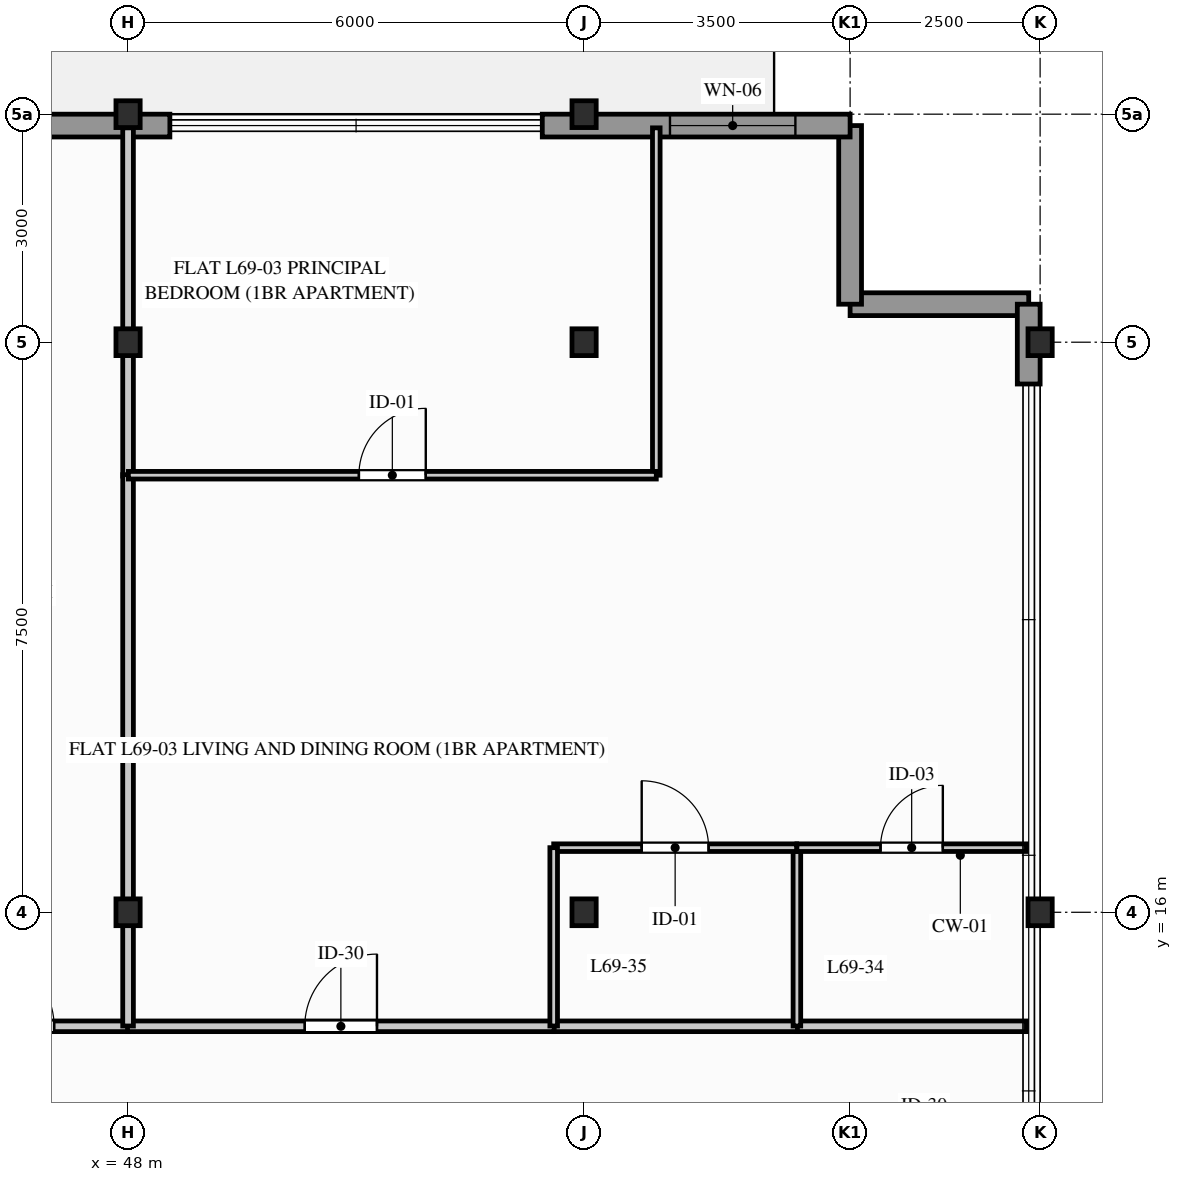
"""IFC4 building model, lengths in metres.
Left out: names, types, materials, properties, quantities, classifications, styles, units other than length and angle.
Written with IfcOpenShell. Run it as: python <this file> out.ifc"""

import sys

from ifc_helpers import new_model, si_unit, direction, frame, frame_2d, origin, origin_2d, place, context, subcontext, project, spatial, rectangle, i_section, extrude, element, fill, save


model = new_model("IFC4")
c1 = context("Model", 3, precision=1e-05, world=origin(), true_north=direction((0.0, 1.0)))
c2 = subcontext(c1, "Body", "Model", "MODEL_VIEW")
j1 = project(units=[si_unit("LENGTHUNIT", "METRE"), si_unit("PLANEANGLEUNIT", "RADIAN")], contexts=[c1])
p1 = place(None, origin())
s1 = spatial("IfcSite", under=j1, at=p1, CompositionType="ELEMENT")
p2 = place(p1, origin())
s2 = spatial("IfcBuilding", under=s1, at=p2, CompositionType="ELEMENT")
p3 = place(p2, frame((0.0, 0.0, 227.3)))
s3 = spatial("IfcBuildingStorey", under=s2, at=p3, CompositionType="ELEMENT", Elevation=227.3)
for number, where, z_axis, x_axis in (
    (1, (48.0, 16.0, 0.0), (0.0, 0.0, 1.0), (1.0, 0.0, 0.0)),
    (2, (48.0, 23.5, 0.0), (0.0, 0.0, 1.0), (1.0, 0.0, 0.0)),
    (3, (48.0, 26.5, 0.0), (0.0, 0.0, 1.0), (1.0, 0.0, 0.0)),
    (4, (54.0, 16.0, 0.0), (0.0, 0.0, 1.0), (1.0, 0.0, 0.0)),
    (5, (54.0, 23.5, 0.0), (0.0, 0.0, 1.0), (1.0, 0.0, 0.0)),
    (6, (54.0, 26.5, 0.0), (0.0, 0.0, 1.0), (1.0, 0.0, 0.0)),
    (7, (60.0, 16.0, 0.0), (0.0, 0.0, 1.0), (1.0, 0.0, 0.0)),
    (8, (60.0, 23.5, 0.0), (0.0, 0.0, 1.0), (1.0, 0.0, 0.0)),
):
    element("IfcColumn", number, at=place(p3, frame(where, z_axis=z_axis, x_axis=x_axis)), inside=s3, PredefinedType="COLUMN", context=c2, shape_type="SweptSolid", body=[
        extrude(i_section(OverallWidth=0.318, OverallDepth=0.353, WebThickness=0.023, FlangeThickness=0.038, FilletRadius=0.015, at=origin_2d()), origin(), (0.0, 0.0, 1.0), 3.1),
    ])
for number, where, z_axis, x_axis in (
    (9, (59.85, 24.0, 0.0), (0.0, 0.0, 1.0), (-1.0, 0.0, 0.0)),
    (10, (57.5, 24.0, 0.0), (0.0, 0.0, 1.0), (0.0, 1.0, 0.0)),
):
    element("IfcWall", number, at=place(p3, frame(where, z_axis=z_axis, x_axis=x_axis)), inside=s3, PredefinedType="STANDARD", context=c2, shape_type="SweptSolid", body=[
        extrude(rectangle(XDim=2.35, YDim=0.3, at=frame_2d((1.175, 0.0))), origin(), (0.0, 0.0, 1.0), 2.89),
    ])
p4 = place(p3, frame((59.85, 22.95, 0.0), z_axis=(0.0, 0.0, 1.0), x_axis=(0.0, 1.0, 0.0)))
e11 = element("IfcWall", 11, at=p4, inside=s3, PredefinedType="STANDARD", context=c2, shape_type="SweptSolid", body=[
    extrude(rectangle(XDim=1.05, YDim=0.3, at=frame_2d((0.525, 0.0))), origin(), (0.0, 0.0, 1.0), 2.89),
])
p5 = place(p3, frame((37.7, 26.35, 0.0), z_axis=(0.0, 0.0, 1.0), x_axis=(1.0, 0.0, 0.0)))
e12 = element("IfcWall", 12, at=p5, inside=s3, PredefinedType="STANDARD", context=c2, shape_type="SweptSolid", body=[
    extrude(rectangle(XDim=10.85, YDim=0.3, at=frame_2d((5.425, 0.0))), origin(), (0.0, 0.0, 1.0), 2.332),
])
p6 = place(p5, frame((5.475, 0.0, 0.0)))
e13 = element("IfcOpeningElement", 13, at=p6, cuts=e12, PredefinedType="OPENING", context=c2, shape_type="SweptSolid", body=[
    extrude(rectangle(XDim=1.25, YDim=2.2, at=frame_2d((0.625, 1.1))), frame((0.0, 0.16, 0.0), z_axis=(0.0, -1.0, 0.0), x_axis=(1.0, 0.0, 0.0)), (0.0, 0.0, 1.0), 0.32),
])
p7 = place(p5, frame((2.081, 0.0, 0.512)))
e14 = element("IfcOpeningElement", 14, at=p7, cuts=e12, PredefinedType="OPENING", context=c2, shape_type="SweptSolid", body=[
    extrude(rectangle(XDim=1.2, YDim=1.6, at=frame_2d((0.6, 0.8))), frame((0.0, 0.16, 0.0), z_axis=(0.0, -1.0, 0.0), x_axis=(1.0, 0.0, 0.0)), (0.0, 0.0, 1.0), 0.32),
])
p8 = place(p3, frame((53.45, 26.35, 0.0), z_axis=(0.0, 0.0, 1.0), x_axis=(1.0, 0.0, 0.0)))
e15 = element("IfcWall", 15, at=p8, inside=s3, PredefinedType="STANDARD", context=c2, shape_type="SweptSolid", body=[
    extrude(rectangle(XDim=4.05, YDim=0.3, at=frame_2d((2.025, 0.0))), origin(), (0.0, 0.0, 1.0), 2.89),
])
p9 = place(p8, frame((1.68, 0.0, 0.77)))
e16 = element("IfcOpeningElement", 16, at=p9, cuts=e15, PredefinedType="OPENING", context=c2, shape_type="SweptSolid", body=[
    extrude(rectangle(XDim=1.65, YDim=1.9, at=frame_2d((0.825, 0.95))), frame((0.0, 0.16, 0.0), z_axis=(0.0, -1.0, 0.0), x_axis=(1.0, 0.0, 0.0)), (0.0, 0.0, 1.0), 0.32),
])
p10 = place(p3, frame((45.093, 14.5, 0.0), z_axis=(0.0, 0.0, 1.0), x_axis=(1.0, 0.0, 0.0)))
e17 = element("IfcWall", 17, at=p10, inside=s3, PredefinedType="PARTITIONING", context=c2, shape_type="SweptSolid", body=[
    extrude(rectangle(XDim=2.918, YDim=0.14, at=frame_2d((1.459, 0.0))), origin(), (0.0, 0.0, 1.0), 2.325),
])
p11 = place(p10, frame((0.984, 0.0, 0.0)))
e18 = element("IfcOpeningElement", 18, at=p11, cuts=e17, PredefinedType="OPENING", context=c2, shape_type="SweptSolid", body=[
    extrude(rectangle(XDim=0.95, YDim=2.05, at=frame_2d((0.475, 1.025))), frame((0.0, 0.08, 0.0), z_axis=(0.0, -1.0, 0.0), x_axis=(1.0, 0.0, 0.0)), (0.0, 0.0, 1.0), 0.16),
])
p12 = place(p3, frame((56.789, 14.5, 0.0), z_axis=(0.0, 0.0, 1.0), x_axis=(1.0, 0.0, 0.0)))
e19 = element("IfcWall", 19, at=p12, inside=s3, PredefinedType="PARTITIONING", context=c2, shape_type="SweptSolid", body=[
    extrude(rectangle(XDim=3.031, YDim=0.14, at=frame_2d((1.516, 0.0))), origin(), (0.0, 0.0, 1.0), 2.89),
])
p13 = place(p3, frame((53.589, 14.5, 0.0), z_axis=(0.0, 0.0, 1.0), x_axis=(1.0, 0.0, 0.0)))
e20 = element("IfcWall", 20, at=p13, inside=s3, PredefinedType="PARTITIONING", context=c2, shape_type="SweptSolid", body=[
    extrude(rectangle(XDim=3.219, YDim=0.14, at=frame_2d((1.609, 0.0))), origin(), (0.0, 0.0, 1.0), 2.325),
])
p14 = place(p3, frame((47.993, 14.5, 0.0), z_axis=(0.0, 0.0, 1.0), x_axis=(1.0, 0.0, 0.0)))
e21 = element("IfcWall", 21, at=p14, inside=s3, PredefinedType="PARTITIONING", context=c2, shape_type="SweptSolid", body=[
    extrude(rectangle(XDim=5.615, YDim=0.14, at=frame_2d((2.807, 0.0))), origin(), (0.0, 0.0, 1.0), 2.325),
])
p15 = place(p14, frame((2.332, 0.0, 0.0)))
e22 = element("IfcOpeningElement", 22, at=p15, cuts=e21, PredefinedType="OPENING", context=c2, shape_type="SweptSolid", body=[
    extrude(rectangle(XDim=0.95, YDim=2.05, at=frame_2d((0.475, 1.025))), frame((0.0, 0.08, 0.0), z_axis=(0.0, -1.0, 0.0), x_axis=(1.0, 0.0, 0.0)), (0.0, 0.0, 1.0), 0.16),
])
p16 = place(p3, frame((48.0, 21.739, 0.0), z_axis=(0.0, 0.0, 1.0), x_axis=(0.0, 1.0, 0.0)))
e23 = element("IfcWall", 23, at=p16, inside=s3, PredefinedType="PARTITIONING", context=c2, shape_type="SweptSolid", body=[
    extrude(rectangle(XDim=4.581, YDim=0.14, at=frame_2d((2.291, 0.0))), origin(), (0.0, 0.0, 1.0), 2.325),
])
p17 = place(p3, frame((48.0, 14.504, 0.0), z_axis=(0.0, 0.0, 1.0), x_axis=(0.0, 1.0, 0.0)))
e24 = element("IfcWall", 24, at=p17, inside=s3, PredefinedType="PARTITIONING", context=c2, shape_type="SweptSolid", body=[
    extrude(rectangle(XDim=7.253, YDim=0.14, at=frame_2d((3.627, 0.0))), origin(), (0.0, 0.0, 1.0), 2.325),
])
p18 = place(p3, frame((56.8, 14.504, 0.0), z_axis=(0.0, 0.0, 1.0), x_axis=(0.0, 1.0, 0.0)))
e25 = element("IfcWall", 25, at=p18, inside=s3, PredefinedType="PARTITIONING", context=c2, shape_type="SweptSolid", body=[
    extrude(rectangle(XDim=2.346, YDim=0.1, at=frame_2d((1.173, 0.0))), origin(), (0.0, 0.0, 1.0), 2.325),
])
p19 = place(p3, frame((56.8, 16.85, 0.0), z_axis=(0.0, 0.0, 1.0), x_axis=(1.0, 0.0, 0.0)))
e26 = element("IfcWall", 26, at=p19, inside=s3, PredefinedType="PARTITIONING", context=c2, shape_type="SweptSolid", body=[
    extrude(rectangle(XDim=3.02, YDim=0.1, at=frame_2d((1.51, 0.0))), origin(), (0.0, 0.0, 1.0), 2.89),
])
p20 = place(p19, frame((1.1, 0.0, 0.0)))
e27 = element("IfcOpeningElement", 27, at=p20, cuts=e26, PredefinedType="OPENING", context=c2, shape_type="SweptSolid", body=[
    extrude(rectangle(XDim=0.82, YDim=2.02, at=frame_2d((0.41, 1.01))), frame((0.0, 0.06, 0.0), z_axis=(0.0, -1.0, 0.0), x_axis=(1.0, 0.0, 0.0)), (0.0, 0.0, 1.0), 0.12),
])
p21 = place(p3, frame((53.6, 16.85, 0.0), z_axis=(0.0, 0.0, 1.0), x_axis=(1.0, 0.0, 0.0)))
e28 = element("IfcWall", 28, at=p21, inside=s3, PredefinedType="PARTITIONING", context=c2, shape_type="SweptSolid", body=[
    extrude(rectangle(XDim=3.196, YDim=0.1, at=frame_2d((1.598, 0.0))), origin(), (0.0, 0.0, 1.0), 2.325),
])
p22 = place(p21, frame((1.158, 0.0, 0.0)))
e29 = element("IfcOpeningElement", 29, at=p22, cuts=e28, PredefinedType="OPENING", context=c2, shape_type="SweptSolid", body=[
    extrude(rectangle(XDim=0.88, YDim=2.04, at=frame_2d((0.44, 1.02))), frame((0.0, 0.06, 0.0), z_axis=(0.0, -1.0, 0.0), x_axis=(1.0, 0.0, 0.0)), (0.0, 0.0, 1.0), 0.12),
])
p23 = place(p3, frame((53.6, 14.504, 0.0), z_axis=(0.0, 0.0, 1.0), x_axis=(0.0, 1.0, 0.0)))
e30 = element("IfcWall", 30, at=p23, inside=s3, PredefinedType="PARTITIONING", context=c2, shape_type="SweptSolid", body=[
    extrude(rectangle(XDim=2.346, YDim=0.1, at=frame_2d((1.173, 0.0))), origin(), (0.0, 0.0, 1.0), 2.325),
])
p24 = place(p3, frame((54.95, 21.75, 0.0), z_axis=(0.0, 0.0, 1.0), x_axis=(0.0, 1.0, 0.0)))
e31 = element("IfcWall", 31, at=p24, inside=s3, PredefinedType="PARTITIONING", context=c2, shape_type="SweptSolid", body=[
    extrude(rectangle(XDim=4.57, YDim=0.1, at=frame_2d((2.285, 0.0))), origin(), (0.0, 0.0, 1.0), 2.325),
])
p25 = place(p3, frame((48.004, 21.75, 0.0), z_axis=(0.0, 0.0, 1.0), x_axis=(1.0, 0.0, 0.0)))
e32 = element("IfcWall", 32, at=p25, inside=s3, PredefinedType="PARTITIONING", context=c2, shape_type="SweptSolid", body=[
    extrude(rectangle(XDim=6.946, YDim=0.1, at=frame_2d((3.473, 0.0))), origin(), (0.0, 0.0, 1.0), 2.325),
])
p26 = place(p25, frame((3.033, 0.0, 0.0)))
e33 = element("IfcOpeningElement", 33, at=p26, cuts=e32, PredefinedType="OPENING", context=c2, shape_type="SweptSolid", body=[
    extrude(rectangle(XDim=0.88, YDim=2.04, at=frame_2d((0.44, 1.02))), frame((0.0, 0.06, 0.0), z_axis=(0.0, -1.0, 0.0), x_axis=(1.0, 0.0, 0.0)), (0.0, 0.0, 1.0), 0.12),
])
p27 = place(p9, origin())
e34 = element("IfcWindow", 34, at=p27, inside=s3, PartitioningType="SINGLE_PANEL", PredefinedType="WINDOW", context=c2, shape_type="SweptSolid", body=[
    extrude(rectangle(XDim=1.65, YDim=1.9, at=frame_2d((0.825, 0.95))), frame((0.0, 0.03, 0.0), z_axis=(0.0, -1.0, 0.0), x_axis=(1.0, 0.0, 0.0)), (0.0, 0.0, 1.0), 0.06),
])
fill(e16, e34)
p28 = place(p11, origin())
e35 = element("IfcDoor", 35, at=p28, inside=s3, OperationType="SINGLE_SWING_LEFT", PredefinedType="DOOR", context=c2, shape_type="SweptSolid", body=[
    extrude(rectangle(XDim=0.95, YDim=2.05, at=frame_2d((0.475, 1.025))), frame((0.0, 0.025, 0.0), z_axis=(0.0, -1.0, 0.0), x_axis=(1.0, 0.0, 0.0)), (0.0, 0.0, 1.0), 0.05),
])
fill(e18, e35)
p29 = place(p15, origin())
e36 = element("IfcDoor", 36, at=p29, inside=s3, OperationType="SINGLE_SWING_RIGHT", PredefinedType="DOOR", context=c2, shape_type="SweptSolid", body=[
    extrude(rectangle(XDim=0.95, YDim=2.05, at=frame_2d((0.475, 1.025))), frame((0.0, 0.025, 0.0), z_axis=(0.0, -1.0, 0.0), x_axis=(1.0, 0.0, 0.0)), (0.0, 0.0, 1.0), 0.05),
])
fill(e22, e36)
p30 = place(p20, origin())
e37 = element("IfcDoor", 37, at=p30, inside=s3, OperationType="SINGLE_SWING_RIGHT", PredefinedType="DOOR", context=c2, shape_type="SweptSolid", body=[
    extrude(rectangle(XDim=0.82, YDim=2.02, at=frame_2d((0.41, 1.01))), frame((0.0, 0.025, 0.0), z_axis=(0.0, -1.0, 0.0), x_axis=(1.0, 0.0, 0.0)), (0.0, 0.0, 1.0), 0.05),
])
fill(e27, e37)
p31 = place(p22, origin())
e38 = element("IfcDoor", 38, at=p31, inside=s3, OperationType="SINGLE_SWING_LEFT", PredefinedType="DOOR", context=c2, shape_type="SweptSolid", body=[
    extrude(rectangle(XDim=0.88, YDim=2.04, at=frame_2d((0.44, 1.02))), frame((0.0, 0.025, 0.0), z_axis=(0.0, -1.0, 0.0), x_axis=(1.0, 0.0, 0.0)), (0.0, 0.0, 1.0), 0.05),
])
fill(e29, e38)
p32 = place(p26, origin())
e39 = element("IfcDoor", 39, at=p32, inside=s3, OperationType="SINGLE_SWING_RIGHT", PredefinedType="DOOR", context=c2, shape_type="SweptSolid", body=[
    extrude(rectangle(XDim=0.88, YDim=2.04, at=frame_2d((0.44, 1.02))), frame((0.0, 0.025, 0.0), z_axis=(0.0, -1.0, 0.0), x_axis=(1.0, 0.0, 0.0)), (0.0, 0.0, 1.0), 0.05),
])
fill(e33, e39)
save(model, sys.argv[1])
